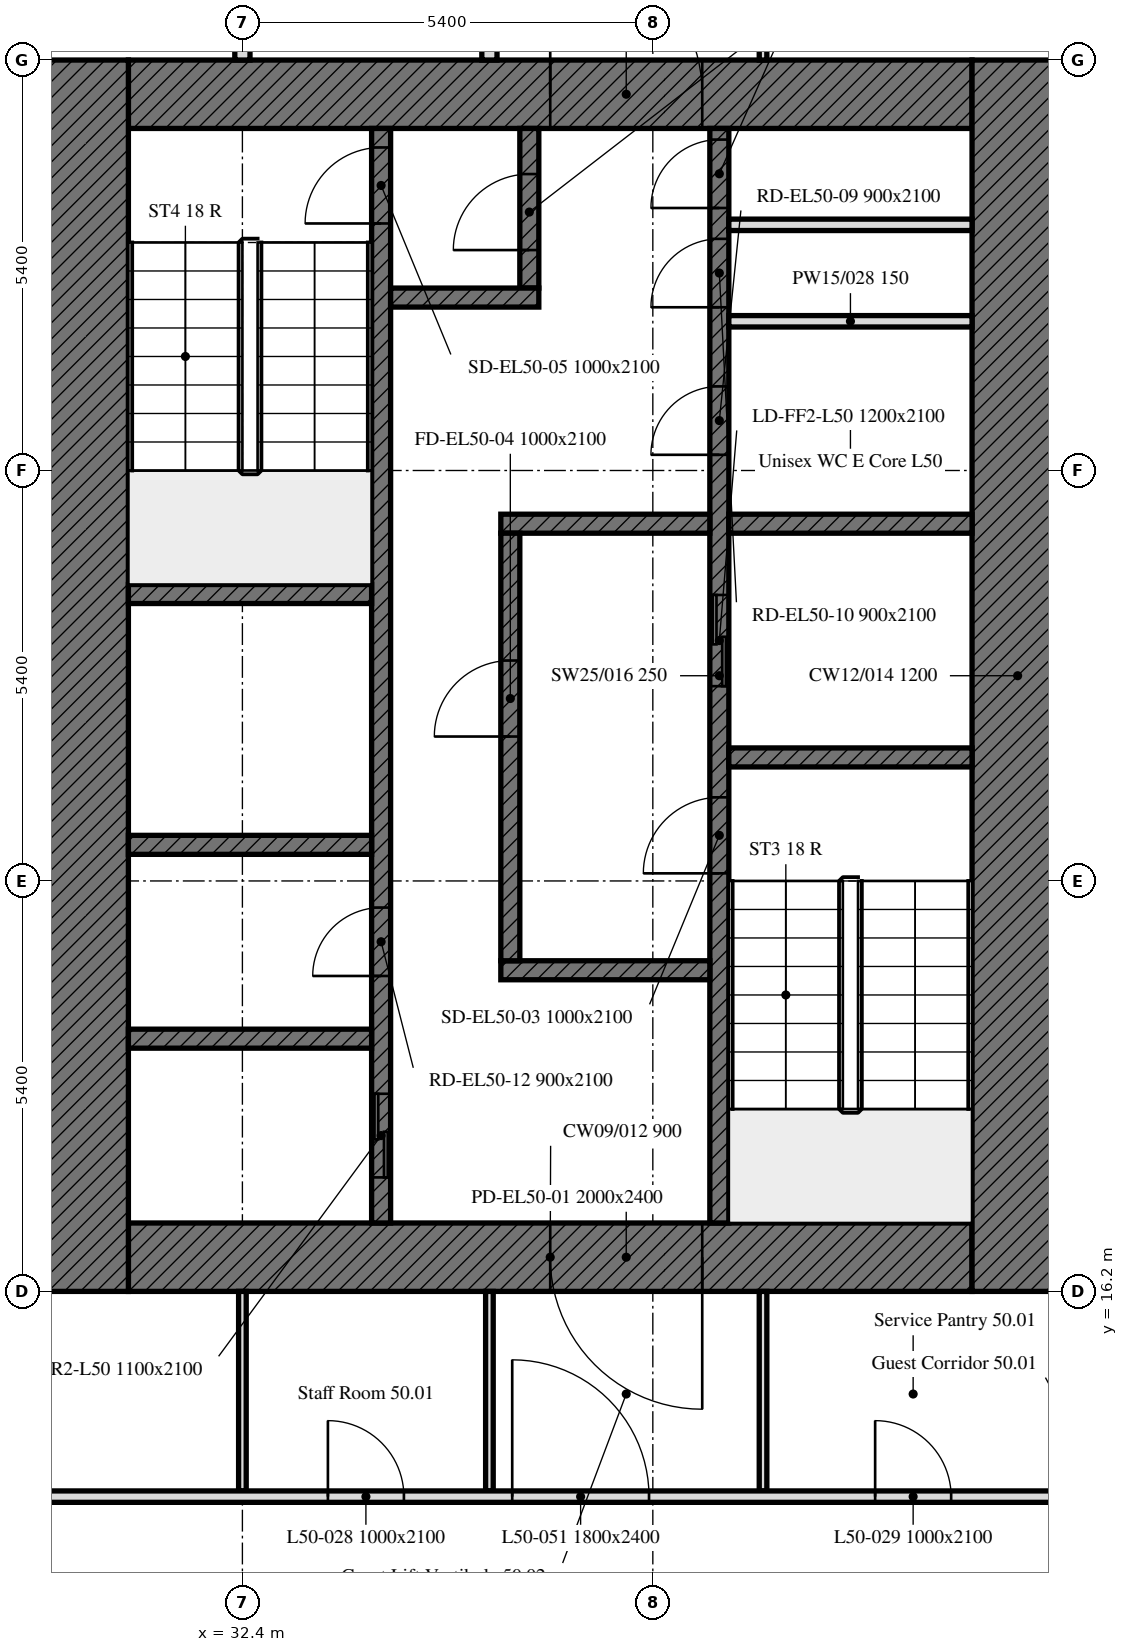
"""IFC4 building model, lengths in metres.
Left out: names, types, materials, properties, quantities, classifications, styles, units other than length and angle.
Written with IfcOpenShell. Run it as: python <this file> out.ifc"""

import sys

from ifc_helpers import new_model, si_unit, direction, frame, frame_2d, origin, place, context, subcontext, project, spatial, rectangle, extrude, element, fill, save


model = new_model("IFC4")
c1 = context("Model", 3, precision=1e-05, world=origin(), true_north=direction((0.0, 1.0)))
c2 = subcontext(c1, "Body", "Model", "MODEL_VIEW")
j1 = project(units=[si_unit("LENGTHUNIT", "METRE"), si_unit("PLANEANGLEUNIT", "RADIAN")], contexts=[c1])
p1 = place(None, origin())
s1 = spatial("IfcSite", under=j1, at=p1, CompositionType="ELEMENT")
p2 = place(p1, origin())
s2 = spatial("IfcBuilding", under=s1, at=p2, CompositionType="ELEMENT")
p3 = place(p2, frame((0.0, 0.0, 203.8)))
s3 = spatial("IfcBuildingStorey", under=s2, at=p3, CompositionType="ELEMENT", Elevation=203.8)
p4 = place(p3, frame((42.0, 16.65, 0.0), z_axis=(0.0, 0.0, 1.0), x_axis=(-1.0, 0.0, 0.0)))
e1 = element("IfcWall", 1, at=p4, inside=s3, PredefinedType="SOLIDWALL", context=c2, shape_type="SweptSolid", body=[
    extrude(rectangle(XDim=11.1, YDim=0.9, at=frame_2d((5.55, 0.0))), origin(), (0.0, 0.0, 1.0), 3.0),
])
p5 = place(p4, frame((3.55, 0.0, 0.0)))
e2 = element("IfcOpeningElement", 2, at=p5, cuts=e1, PredefinedType="OPENING", context=c2, shape_type="SweptSolid", body=[
    extrude(rectangle(XDim=2.0, YDim=2.4, at=frame_2d((1.0, 1.2))), frame((0.0, 0.45, 0.0), z_axis=(0.0, -1.0, 0.0), x_axis=(1.0, 0.0, 0.0)), (0.0, 0.0, 1.0), 0.9),
])
p6 = place(p3, frame((30.9, 31.95, 0.0), z_axis=(0.0, 0.0, 1.0), x_axis=(1.0, 0.0, 0.0)))
e3 = element("IfcWall", 3, at=p6, inside=s3, PredefinedType="SOLIDWALL", context=c2, shape_type="SweptSolid", body=[
    extrude(rectangle(XDim=11.1, YDim=0.9, at=frame_2d((5.55, 0.0))), origin(), (0.0, 0.0, 1.0), 3.0),
])
p7 = place(p6, frame((5.55, 0.0, 0.0)))
e4 = element("IfcOpeningElement", 4, at=p7, cuts=e3, PredefinedType="OPENING", context=c2, shape_type="SweptSolid", body=[
    extrude(rectangle(XDim=2.0, YDim=2.4, at=frame_2d((1.0, 1.2))), frame((0.0, 0.45, 0.0), z_axis=(0.0, -1.0, 0.0), x_axis=(1.0, 0.0, 0.0)), (0.0, 0.0, 1.0), 0.9),
])
for number, where, z_axis, x_axis in (
    (5, (42.6, 32.4, 0.0), (0.0, 0.0, 1.0), (0.0, -1.0, 0.0)),
    (6, (30.3, 16.2, 0.0), (0.0, 0.0, 1.0), (0.0, 1.0, 0.0)),
):
    element("IfcWall", number, at=place(p3, frame(where, z_axis=z_axis, x_axis=x_axis)), inside=s3, PredefinedType="SOLIDWALL", context=c2, shape_type="SweptSolid", body=[
        extrude(rectangle(XDim=16.2, YDim=1.2, at=frame_2d((8.1, 0.0))), origin(), (0.0, 0.0, 1.0), 3.0),
    ])
p8 = place(p3, frame((38.675, 17.1, 0.0), z_axis=(0.0, 0.0, 1.0), x_axis=(0.0, 1.0, 0.0)))
e7 = element("IfcWall", 7, at=p8, inside=s3, PredefinedType="SOLIDWALL", context=c2, shape_type="SweptSolid", body=[
    extrude(rectangle(XDim=14.4, YDim=0.25, at=frame_2d((7.2, 0.0))), origin(), (0.0, 0.0, 1.0), 3.0),
])
p9 = place(p8, frame((4.6, 0.0, 0.0)))
e8 = element("IfcOpeningElement", 8, at=p9, cuts=e7, PredefinedType="OPENING", context=c2, shape_type="SweptSolid", body=[
    extrude(rectangle(XDim=1.0, YDim=2.1, at=frame_2d((0.5, 1.05))), frame((0.0, 0.125, 0.0), z_axis=(0.0, -1.0, 0.0), x_axis=(1.0, 0.0, 0.0)), (0.0, 0.0, 1.0), 0.25),
])
p10 = place(p8, frame((7.062, 0.0, 0.0)))
e9 = element("IfcOpeningElement", 9, at=p10, cuts=e7, PredefinedType="OPENING", context=c2, shape_type="SweptSolid", body=[
    extrude(rectangle(XDim=1.2, YDim=2.1, at=frame_2d((0.6, 1.05))), frame((0.0, 0.125, 0.0), z_axis=(0.0, -1.0, 0.0), x_axis=(1.0, 0.0, 0.0)), (0.0, 0.0, 1.0), 0.25),
])
p11 = place(p8, frame((10.106, 0.0, 0.0)))
e10 = element("IfcOpeningElement", 10, at=p11, cuts=e7, PredefinedType="OPENING", context=c2, shape_type="SweptSolid", body=[
    extrude(rectangle(XDim=0.9, YDim=2.1, at=frame_2d((0.45, 1.05))), frame((0.0, 0.125, 0.0), z_axis=(0.0, -1.0, 0.0), x_axis=(1.0, 0.0, 0.0)), (0.0, 0.0, 1.0), 0.25),
])
p12 = place(p8, frame((12.048, 0.0, 0.0)))
e11 = element("IfcOpeningElement", 11, at=p12, cuts=e7, PredefinedType="OPENING", context=c2, shape_type="SweptSolid", body=[
    extrude(rectangle(XDim=0.9, YDim=2.1, at=frame_2d((0.45, 1.05))), frame((0.0, 0.125, 0.0), z_axis=(0.0, -1.0, 0.0), x_axis=(1.0, 0.0, 0.0)), (0.0, 0.0, 1.0), 0.25),
])
p13 = place(p8, frame((13.354, 0.0, 0.0)))
e12 = element("IfcOpeningElement", 12, at=p13, cuts=e7, PredefinedType="OPENING", context=c2, shape_type="SweptSolid", body=[
    extrude(rectangle(XDim=0.9, YDim=2.1, at=frame_2d((0.45, 1.05))), frame((0.0, 0.125, 0.0), z_axis=(0.0, -1.0, 0.0), x_axis=(1.0, 0.0, 0.0)), (0.0, 0.0, 1.0), 0.25),
])
p14 = place(p3, frame((34.225, 17.1, 0.0), z_axis=(0.0, 0.0, 1.0), x_axis=(0.0, 1.0, 0.0)))
e13 = element("IfcWall", 13, at=p14, inside=s3, PredefinedType="SOLIDWALL", context=c2, shape_type="SweptSolid", body=[
    extrude(rectangle(XDim=14.4, YDim=0.25, at=frame_2d((7.2, 0.0))), origin(), (0.0, 0.0, 1.0), 3.0),
])
p15 = place(p14, frame((13.15, 0.0, 0.0)))
e14 = element("IfcOpeningElement", 14, at=p15, cuts=e13, PredefinedType="OPENING", context=c2, shape_type="SweptSolid", body=[
    extrude(rectangle(XDim=1.0, YDim=2.1, at=frame_2d((0.5, 1.05))), frame((0.0, 0.125, 0.0), z_axis=(0.0, -1.0, 0.0), x_axis=(1.0, 0.0, 0.0)), (0.0, 0.0, 1.0), 0.25),
])
p16 = place(p14, frame((0.6, 0.0, 0.0)))
e15 = element("IfcOpeningElement", 15, at=p16, cuts=e13, PredefinedType="OPENING", context=c2, shape_type="SweptSolid", body=[
    extrude(rectangle(XDim=1.1, YDim=2.1, at=frame_2d((0.55, 1.05))), frame((0.0, 0.125, 0.0), z_axis=(0.0, -1.0, 0.0), x_axis=(1.0, 0.0, 0.0)), (0.0, 0.0, 1.0), 0.25),
])
p17 = place(p14, frame((3.25, 0.0, 0.0)))
e16 = element("IfcOpeningElement", 16, at=p17, cuts=e13, PredefinedType="OPENING", context=c2, shape_type="SweptSolid", body=[
    extrude(rectangle(XDim=0.9, YDim=2.1, at=frame_2d((0.45, 1.05))), frame((0.0, 0.125, 0.0), z_axis=(0.0, -1.0, 0.0), x_axis=(1.0, 0.0, 0.0)), (0.0, 0.0, 1.0), 0.25),
])
p18 = place(p3, frame((38.8, 23.225, 0.0), z_axis=(0.0, 0.0, 1.0), x_axis=(1.0, 0.0, 0.0)))
e17 = element("IfcWall", 17, at=p18, inside=s3, PredefinedType="SOLIDWALL", context=c2, shape_type="SweptSolid", body=[
    extrude(rectangle(XDim=3.2, YDim=0.25, at=frame_2d((1.6, 0.0))), origin(), (0.0, 0.0, 1.0), 3.0),
])
for number, where, z_axis, x_axis in (
    (18, (30.9, 25.375, 0.0), (0.0, 0.0, 1.0), (1.0, 0.0, 0.0)),
    (19, (30.9, 22.075, 0.0), (0.0, 0.0, 1.0), (1.0, 0.0, 0.0)),
):
    element("IfcWall", number, at=place(p3, frame(where, z_axis=z_axis, x_axis=x_axis)), inside=s3, PredefinedType="SOLIDWALL", context=c2, shape_type="SweptSolid", body=[
        extrude(rectangle(XDim=3.2, YDim=0.25, at=frame_2d((1.6, 0.0))), origin(), (0.0, 0.0, 1.0), 3.0),
    ])
p19 = place(p3, frame((38.8, 26.3, 0.0), z_axis=(0.0, 0.0, 1.0), x_axis=(1.0, 0.0, 0.0)))
e20 = element("IfcWall", 20, at=p19, inside=s3, PredefinedType="SOLIDWALL", context=c2, shape_type="SweptSolid", body=[
    extrude(rectangle(XDim=3.2, YDim=0.25, at=frame_2d((1.6, 0.0))), origin(), (0.0, 0.0, 1.0), 3.0),
])
for number, where, z_axis, x_axis in (
    (21, (35.8, 26.3, 0.0), (0.0, 0.0, 1.0), (1.0, 0.0, 0.0)),
    (22, (35.8, 20.425, 0.0), (0.0, 0.0, 1.0), (1.0, 0.0, 0.0)),
):
    element("IfcWall", number, at=place(p3, frame(where, z_axis=z_axis, x_axis=x_axis)), inside=s3, PredefinedType="SOLIDWALL", context=c2, shape_type="SweptSolid", body=[
        extrude(rectangle(XDim=2.75, YDim=0.25, at=frame_2d((1.375, 0.0))), origin(), (0.0, 0.0, 1.0), 3.0),
    ])
p20 = place(p3, frame((36.175, 29.4, 0.0), z_axis=(0.0, 0.0, 1.0), x_axis=(0.0, 1.0, 0.0)))
e23 = element("IfcWall", 23, at=p20, inside=s3, PredefinedType="SOLIDWALL", context=c2, shape_type="SweptSolid", body=[
    extrude(rectangle(XDim=2.1, YDim=0.25, at=frame_2d((1.05, 0.0))), origin(), (0.0, 0.0, 1.0), 3.0),
])
p21 = place(p20, frame((0.5, 0.0, 0.0)))
e24 = element("IfcOpeningElement", 24, at=p21, cuts=e23, PredefinedType="OPENING", context=c2, shape_type="SweptSolid", body=[
    extrude(rectangle(XDim=1.0, YDim=2.1, at=frame_2d((0.5, 1.05))), frame((0.0, 0.125, 0.0), z_axis=(0.0, -1.0, 0.0), x_axis=(1.0, 0.0, 0.0)), (0.0, 0.0, 1.0), 0.25),
])
p22 = place(p3, frame((34.35, 29.275, 0.0), z_axis=(0.0, 0.0, 1.0), x_axis=(1.0, 0.0, 0.0)))
e25 = element("IfcWall", 25, at=p22, inside=s3, PredefinedType="SOLIDWALL", context=c2, shape_type="SweptSolid", body=[
    extrude(rectangle(XDim=1.95, YDim=0.25, at=frame_2d((0.975, 0.0))), origin(), (0.0, 0.0, 1.0), 3.0),
])
p23 = place(p3, frame((35.925, 20.55, 0.0), z_axis=(0.0, 0.0, 1.0), x_axis=(0.0, 1.0, 0.0)))
e26 = element("IfcWall", 26, at=p23, inside=s3, PredefinedType="SOLIDWALL", context=c2, shape_type="SweptSolid", body=[
    extrude(rectangle(XDim=5.625, YDim=0.25, at=frame_2d((2.812, 0.0))), origin(), (0.0, 0.0, 1.0), 3.0),
])
p24 = place(p23, frame((2.95, 0.0, 0.0)))
e27 = element("IfcOpeningElement", 27, at=p24, cuts=e26, PredefinedType="OPENING", context=c2, shape_type="SweptSolid", body=[
    extrude(rectangle(XDim=1.0, YDim=2.1, at=frame_2d((0.5, 1.05))), frame((0.0, 0.125, 0.0), z_axis=(0.0, -1.0, 0.0), x_axis=(1.0, 0.0, 0.0)), (0.0, 0.0, 1.0), 0.25),
])
p25 = place(p3, frame((30.9, 19.525, 0.0), z_axis=(0.0, 0.0, 1.0), x_axis=(1.0, 0.0, 0.0)))
e28 = element("IfcWall", 28, at=p25, inside=s3, PredefinedType="SOLIDWALL", context=c2, shape_type="SweptSolid", body=[
    extrude(rectangle(XDim=3.2, YDim=0.25, at=frame_2d((1.6, 0.0))), origin(), (0.0, 0.0, 1.0), 3.0),
])
for number, where, z_axis, x_axis in (
    (29, (38.8, 28.963, 0.0), (0.0, 0.0, 1.0), (1.0, 0.0, 0.0)),
    (30, (38.8, 30.232, 0.0), (0.0, 0.0, 1.0), (1.0, 0.0, 0.0)),
):
    element("IfcWall", number, at=place(p3, frame(where, z_axis=z_axis, x_axis=x_axis)), inside=s3, PredefinedType="PARTITIONING", context=c2, shape_type="SweptSolid", body=[
        extrude(rectangle(XDim=3.2, YDim=0.15, at=frame_2d((1.6, 0.0))), origin(), (0.0, 0.0, 1.0), 3.0),
    ])
p26 = place(p3, frame((32.4, 32.4, 0.0), z_axis=(0.0, 0.0, 1.0), x_axis=(0.0, 1.0, 0.0)))
e31 = element("IfcWall", 31, at=p26, inside=s3, PredefinedType="PARTITIONING", context=c2, shape_type="SweptSolid", body=[
    extrude(rectangle(XDim=4.98, YDim=0.2, at=frame_2d((2.49, 0.0))), origin(), (0.0, 0.0, 1.0), 2.4),
])
p27 = place(p3, frame((35.65, 40.6, 0.0), z_axis=(0.0, 0.0, 1.0), x_axis=(0.0, -1.0, 0.0)))
e32 = element("IfcWall", 32, at=p27, inside=s3, PredefinedType="PARTITIONING", context=c2, shape_type="SweptSolid", body=[
    extrude(rectangle(XDim=8.2, YDim=0.2, at=frame_2d((4.1, 0.0))), origin(), (0.0, 0.0, 1.0), 2.4),
])
p28 = place(p3, frame((39.25, 32.4, 0.0), z_axis=(0.0, 0.0, 1.0), x_axis=(0.0, 1.0, 0.0)))
e33 = element("IfcWall", 33, at=p28, inside=s3, PredefinedType="PARTITIONING", context=c2, shape_type="SweptSolid", body=[
    extrude(rectangle(XDim=8.025, YDim=0.1, at=frame_2d((4.013, 0.0))), origin(), (0.0, 0.0, 1.0), 2.4),
])
for number, where, z_axis, x_axis in (
    (34, (32.4, 13.575, 0.0), (0.0, 0.0, 1.0), (0.0, 1.0, 0.0)),
    (35, (35.65, 16.2, 0.0), (0.0, 0.0, 1.0), (0.0, -1.0, 0.0)),
    (36, (39.25, 13.575, 0.0), (0.0, 0.0, 1.0), (0.0, 1.0, 0.0)),
):
    element("IfcWall", number, at=place(p3, frame(where, z_axis=z_axis, x_axis=x_axis)), inside=s3, PredefinedType="PARTITIONING", context=c2, shape_type="SweptSolid", body=[
        extrude(rectangle(XDim=2.625, YDim=0.1, at=frame_2d((1.312, 0.0))), origin(), (0.0, 0.0, 1.0), 3.0),
    ])
p29 = place(p3, frame((6.151, 13.5, 0.0), z_axis=(0.0, 0.0, 1.0), x_axis=(1.0, 0.0, 0.0)))
e37 = element("IfcWall", 37, at=p29, inside=s3, PredefinedType="PARTITIONING", context=c2, shape_type="SweptSolid", body=[
    extrude(rectangle(XDim=36.974, YDim=0.15, at=frame_2d((18.487, 0.0))), origin(), (0.0, 0.0, 1.0), 3.0),
])
p30 = place(p29, frame((12.249, 0.0, 0.0)))
e38 = element("IfcOpeningElement", 38, at=p30, cuts=e37, PredefinedType="OPENING", context=c2, shape_type="SweptSolid", body=[
    extrude(rectangle(XDim=1.0, YDim=2.1, at=frame_2d((0.5, 1.05))), frame((0.0, 0.075, 0.0), z_axis=(0.0, -1.0, 0.0), x_axis=(1.0, 0.0, 0.0)), (0.0, 0.0, 1.0), 0.15),
])
p31 = place(p29, frame((18.816, 0.0, 0.0)))
e39 = element("IfcOpeningElement", 39, at=p31, cuts=e37, PredefinedType="OPENING", context=c2, shape_type="SweptSolid", body=[
    extrude(rectangle(XDim=1.0, YDim=2.1, at=frame_2d((0.5, 1.05))), frame((0.0, 0.075, 0.0), z_axis=(0.0, -1.0, 0.0), x_axis=(1.0, 0.0, 0.0)), (0.0, 0.0, 1.0), 0.15),
])
p32 = place(p29, frame((2.029, 0.0, 0.0)))
e40 = element("IfcOpeningElement", 40, at=p32, cuts=e37, PredefinedType="OPENING", context=c2, shape_type="SweptSolid", body=[
    extrude(rectangle(XDim=1.0, YDim=2.1, at=frame_2d((0.5, 1.05))), frame((0.0, 0.075, 0.0), z_axis=(0.0, -1.0, 0.0), x_axis=(1.0, 0.0, 0.0)), (0.0, 0.0, 1.0), 0.15),
])
p33 = place(p29, frame((27.374, 0.0, 0.0)))
e41 = element("IfcOpeningElement", 41, at=p33, cuts=e37, PredefinedType="OPENING", context=c2, shape_type="SweptSolid", body=[
    extrude(rectangle(XDim=1.0, YDim=2.1, at=frame_2d((0.5, 1.05))), frame((0.0, 0.075, 0.0), z_axis=(0.0, -1.0, 0.0), x_axis=(1.0, 0.0, 0.0)), (0.0, 0.0, 1.0), 0.15),
])
p34 = place(p29, frame((34.574, 0.0, 0.0)))
e42 = element("IfcOpeningElement", 42, at=p34, cuts=e37, PredefinedType="OPENING", context=c2, shape_type="SweptSolid", body=[
    extrude(rectangle(XDim=1.0, YDim=2.1, at=frame_2d((0.5, 1.05))), frame((0.0, 0.075, 0.0), z_axis=(0.0, -1.0, 0.0), x_axis=(1.0, 0.0, 0.0)), (0.0, 0.0, 1.0), 0.15),
])
p35 = place(p29, frame((7.924, 0.0, 0.0)))
e43 = element("IfcOpeningElement", 43, at=p35, cuts=e37, PredefinedType="OPENING", context=c2, shape_type="SweptSolid", body=[
    extrude(rectangle(XDim=1.0, YDim=2.1, at=frame_2d((0.5, 1.05))), frame((0.0, 0.075, 0.0), z_axis=(0.0, -1.0, 0.0), x_axis=(1.0, 0.0, 0.0)), (0.0, 0.0, 1.0), 0.15),
])
p36 = place(p29, frame((4.699, 0.0, 0.0)))
e44 = element("IfcOpeningElement", 44, at=p36, cuts=e37, PredefinedType="OPENING", context=c2, shape_type="SweptSolid", body=[
    extrude(rectangle(XDim=1.8, YDim=2.4, at=frame_2d((0.9, 1.2))), frame((0.0, 0.075, 0.0), z_axis=(0.0, -1.0, 0.0), x_axis=(1.0, 0.0, 0.0)), (0.0, 0.0, 1.0), 0.15),
])
p37 = place(p29, frame((29.799, 0.0, 0.0)))
e45 = element("IfcOpeningElement", 45, at=p37, cuts=e37, PredefinedType="OPENING", context=c2, shape_type="SweptSolid", body=[
    extrude(rectangle(XDim=1.8, YDim=2.4, at=frame_2d((0.9, 1.2))), frame((0.0, 0.075, 0.0), z_axis=(0.0, -1.0, 0.0), x_axis=(1.0, 0.0, 0.0)), (0.0, 0.0, 1.0), 0.15),
])
p38 = place(p5, origin())
e46 = element("IfcDoor", 46, at=p38, inside=s3, OperationType="DOUBLE_DOOR_SINGLE_SWING", PredefinedType="DOOR", context=c2, shape_type="SweptSolid", body=[
    extrude(rectangle(XDim=2.0, YDim=2.4, at=frame_2d((1.0, 1.2))), frame((0.0, 0.025, 0.0), z_axis=(0.0, -1.0, 0.0), x_axis=(1.0, 0.0, 0.0)), (0.0, 0.0, 1.0), 0.05),
])
fill(e2, e46)
p39 = place(p7, origin())
e47 = element("IfcDoor", 47, at=p39, inside=s3, OperationType="DOUBLE_DOOR_SINGLE_SWING", PredefinedType="DOOR", context=c2, shape_type="SweptSolid", body=[
    extrude(rectangle(XDim=2.0, YDim=2.4, at=frame_2d((1.0, 1.2))), frame((0.0, 0.025, 0.0), z_axis=(0.0, -1.0, 0.0), x_axis=(1.0, 0.0, 0.0)), (0.0, 0.0, 1.0), 0.05),
])
fill(e4, e47)
p40 = place(p9, origin())
e48 = element("IfcDoor", 48, at=p40, inside=s3, OperationType="SINGLE_SWING_LEFT", PredefinedType="DOOR", context=c2, shape_type="SweptSolid", body=[
    extrude(rectangle(XDim=1.0, YDim=2.1, at=frame_2d((0.5, 1.05))), frame((0.0, 0.025, 0.0), z_axis=(0.0, -1.0, 0.0), x_axis=(1.0, 0.0, 0.0)), (0.0, 0.0, 1.0), 0.05),
])
fill(e8, e48)
p41 = place(p24, origin())
e49 = element("IfcDoor", 49, at=p41, inside=s3, OperationType="SINGLE_SWING_LEFT", PredefinedType="DOOR", context=c2, shape_type="SweptSolid", body=[
    extrude(rectangle(XDim=1.0, YDim=2.1, at=frame_2d((0.5, 1.05))), frame((0.0, 0.025, 0.0), z_axis=(0.0, -1.0, 0.0), x_axis=(1.0, 0.0, 0.0)), (0.0, 0.0, 1.0), 0.05),
])
fill(e27, e49)
p42 = place(p15, origin())
e50 = element("IfcDoor", 50, at=p42, inside=s3, OperationType="SINGLE_SWING_LEFT", PredefinedType="DOOR", context=c2, shape_type="SweptSolid", body=[
    extrude(rectangle(XDim=1.0, YDim=2.1, at=frame_2d((0.5, 1.05))), frame((0.0, 0.025, 0.0), z_axis=(0.0, -1.0, 0.0), x_axis=(1.0, 0.0, 0.0)), (0.0, 0.0, 1.0), 0.05),
])
fill(e14, e50)
p43 = place(p21, origin())
e51 = element("IfcDoor", 51, at=p43, inside=s3, OperationType="SINGLE_SWING_LEFT", PredefinedType="DOOR", context=c2, shape_type="SweptSolid", body=[
    extrude(rectangle(XDim=1.0, YDim=2.1, at=frame_2d((0.5, 1.05))), frame((0.0, 0.025, 0.0), z_axis=(0.0, -1.0, 0.0), x_axis=(1.0, 0.0, 0.0)), (0.0, 0.0, 1.0), 0.05),
])
fill(e24, e51)
p44 = place(p10, origin())
e52 = element("IfcDoor", 52, at=p44, inside=s3, OperationType="DOUBLE_DOOR_SLIDING", PredefinedType="DOOR", context=c2, shape_type="SweptSolid", body=[
    extrude(rectangle(XDim=1.2, YDim=2.1, at=frame_2d((0.6, 1.05))), frame((0.0, 0.025, 0.0), z_axis=(0.0, -1.0, 0.0), x_axis=(1.0, 0.0, 0.0)), (0.0, 0.0, 1.0), 0.05),
])
fill(e9, e52)
p45 = place(p16, origin())
e53 = element("IfcDoor", 53, at=p45, inside=s3, OperationType="DOUBLE_DOOR_SLIDING", PredefinedType="DOOR", context=c2, shape_type="SweptSolid", body=[
    extrude(rectangle(XDim=1.1, YDim=2.1, at=frame_2d((0.55, 1.05))), frame((0.0, 0.025, 0.0), z_axis=(0.0, -1.0, 0.0), x_axis=(1.0, 0.0, 0.0)), (0.0, 0.0, 1.0), 0.05),
])
fill(e15, e53)
p46 = place(p11, origin())
e54 = element("IfcDoor", 54, at=p46, inside=s3, OperationType="SINGLE_SWING_LEFT", PredefinedType="DOOR", context=c2, shape_type="SweptSolid", body=[
    extrude(rectangle(XDim=0.9, YDim=2.1, at=frame_2d((0.45, 1.05))), frame((0.0, 0.025, 0.0), z_axis=(0.0, -1.0, 0.0), x_axis=(1.0, 0.0, 0.0)), (0.0, 0.0, 1.0), 0.05),
])
fill(e10, e54)
p47 = place(p12, origin())
e55 = element("IfcDoor", 55, at=p47, inside=s3, OperationType="SINGLE_SWING_LEFT", PredefinedType="DOOR", context=c2, shape_type="SweptSolid", body=[
    extrude(rectangle(XDim=0.9, YDim=2.1, at=frame_2d((0.45, 1.05))), frame((0.0, 0.025, 0.0), z_axis=(0.0, -1.0, 0.0), x_axis=(1.0, 0.0, 0.0)), (0.0, 0.0, 1.0), 0.05),
])
fill(e11, e55)
p48 = place(p13, origin())
e56 = element("IfcDoor", 56, at=p48, inside=s3, OperationType="SINGLE_SWING_LEFT", PredefinedType="DOOR", context=c2, shape_type="SweptSolid", body=[
    extrude(rectangle(XDim=0.9, YDim=2.1, at=frame_2d((0.45, 1.05))), frame((0.0, 0.025, 0.0), z_axis=(0.0, -1.0, 0.0), x_axis=(1.0, 0.0, 0.0)), (0.0, 0.0, 1.0), 0.05),
])
fill(e12, e56)
p49 = place(p17, origin())
e57 = element("IfcDoor", 57, at=p49, inside=s3, OperationType="SINGLE_SWING_LEFT", PredefinedType="DOOR", context=c2, shape_type="SweptSolid", body=[
    extrude(rectangle(XDim=0.9, YDim=2.1, at=frame_2d((0.45, 1.05))), frame((0.0, 0.025, 0.0), z_axis=(0.0, -1.0, 0.0), x_axis=(1.0, 0.0, 0.0)), (0.0, 0.0, 1.0), 0.05),
])
fill(e16, e57)
p50 = place(p33, origin())
e58 = element("IfcDoor", 58, at=p50, inside=s3, OperationType="SINGLE_SWING_LEFT", PredefinedType="DOOR", context=c2, shape_type="SweptSolid", body=[
    extrude(rectangle(XDim=1.0, YDim=2.1, at=frame_2d((0.5, 1.05))), frame((0.0, 0.025, 0.0), z_axis=(0.0, -1.0, 0.0), x_axis=(1.0, 0.0, 0.0)), (0.0, 0.0, 1.0), 0.05),
])
fill(e41, e58)
p51 = place(p34, origin())
e59 = element("IfcDoor", 59, at=p51, inside=s3, OperationType="SINGLE_SWING_RIGHT", PredefinedType="DOOR", context=c2, shape_type="SweptSolid", body=[
    extrude(rectangle(XDim=1.0, YDim=2.1, at=frame_2d((0.5, 1.05))), frame((0.0, 0.025, 0.0), z_axis=(0.0, -1.0, 0.0), x_axis=(1.0, 0.0, 0.0)), (0.0, 0.0, 1.0), 0.05),
])
fill(e42, e59)
p52 = place(p37, origin())
e60 = element("IfcDoor", 60, at=p52, inside=s3, OperationType="DOUBLE_DOOR_SINGLE_SWING", PredefinedType="DOOR", context=c2, shape_type="SweptSolid", body=[
    extrude(rectangle(XDim=1.8, YDim=2.4, at=frame_2d((0.9, 1.2))), frame((0.0, 0.025, 0.0), z_axis=(0.0, -1.0, 0.0), x_axis=(1.0, 0.0, 0.0)), (0.0, 0.0, 1.0), 0.05),
])
fill(e45, e60)
save(model, sys.argv[1])
